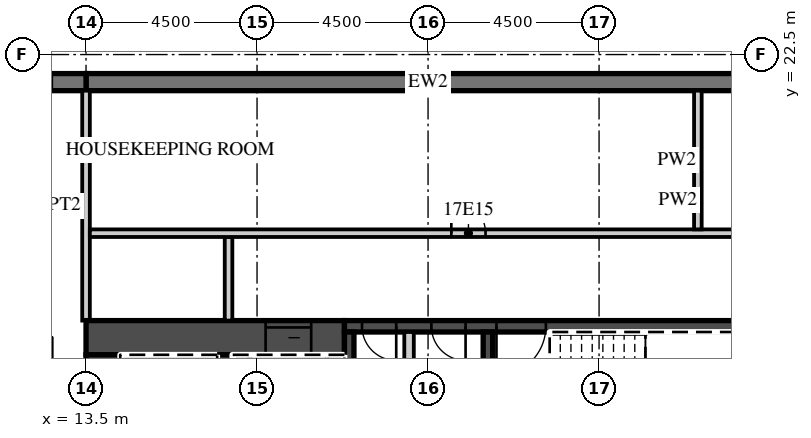
"""IFC4 building model, lengths in metres.
Left out: names, types, materials, properties, quantities, classifications, styles, units other than length and angle.
Written with IfcOpenShell. Run it as: python <this file> out.ifc"""

import sys

from ifc_helpers import new_model, si_unit, direction, frame, frame_2d, origin, place, context, subcontext, project, spatial, rectangle, extrude, element, fill, save


model = new_model("IFC4")
c1 = context("Model", 3, precision=1e-05, world=origin(), true_north=direction((0.0, 1.0)))
c2 = subcontext(c1, "Body", "Model", "MODEL_VIEW")
j1 = project(units=[si_unit("LENGTHUNIT", "METRE"), si_unit("PLANEANGLEUNIT", "RADIAN")], contexts=[c1])
p1 = place(None, origin())
s1 = spatial("IfcSite", under=j1, at=p1, CompositionType="ELEMENT")
p2 = place(p1, origin())
s2 = spatial("IfcBuilding", under=s1, at=p2, CompositionType="ELEMENT")
p3 = place(p2, frame((0.0, 0.0, 86.4)))
s3 = spatial("IfcBuildingStorey", under=s2, at=p3, CompositionType="ELEMENT", Elevation=86.4)
p4 = place(p3, frame((31.5, 21.775, 0.0), z_axis=(0.0, 0.0, 1.0), x_axis=(-1.0, 0.0, 0.0)))
e1 = element("IfcWall", 1, at=p4, inside=s3, PredefinedType="SOLIDWALL", context=c2, shape_type="SweptSolid", body=[
    extrude(rectangle(XDim=18.0, YDim=0.45, at=frame_2d((9.0, 0.0))), origin(), (0.0, 0.0, 1.0), 3.02),
])
p5 = place(p3, frame((13.5, 21.775, 0.0), z_axis=(0.0, 0.0, 1.0), x_axis=(-1.0, 0.0, 0.0)))
e2 = element("IfcWall", 2, at=p5, inside=s3, PredefinedType="SOLIDWALL", context=c2, shape_type="SweptSolid", body=[
    extrude(rectangle(XDim=54.5, YDim=0.45, at=frame_2d((27.25, 0.0))), origin(), (0.0, 0.0, 1.0), 3.02),
])
p6 = place(p5, frame((0.9, 0.0, 0.45)))
e3 = element("IfcOpeningElement", 3, at=p6, cuts=e2, PredefinedType="OPENING", context=c2, shape_type="SweptSolid", body=[
    extrude(rectangle(XDim=2.7, YDim=2.25, at=frame_2d((1.35, 1.125))), frame((0.0, 0.235, 0.0), z_axis=(0.0, -1.0, 0.0), x_axis=(1.0, 0.0, 0.0)), (0.0, 0.0, 1.0), 0.47),
])
p7 = place(p5, frame((5.4, 0.0, 0.45)))
e4 = element("IfcOpeningElement", 4, at=p7, cuts=e2, PredefinedType="OPENING", context=c2, shape_type="SweptSolid", body=[
    extrude(rectangle(XDim=2.7, YDim=2.25, at=frame_2d((1.35, 1.125))), frame((0.0, 0.235, 0.0), z_axis=(0.0, -1.0, 0.0), x_axis=(1.0, 0.0, 0.0)), (0.0, 0.0, 1.0), 0.47),
])
p8 = place(p5, frame((9.9, 0.0, 0.45)))
e5 = element("IfcOpeningElement", 5, at=p8, cuts=e2, PredefinedType="OPENING", context=c2, shape_type="SweptSolid", body=[
    extrude(rectangle(XDim=2.7, YDim=2.25, at=frame_2d((1.35, 1.125))), frame((0.0, 0.235, 0.0), z_axis=(0.0, -1.0, 0.0), x_axis=(1.0, 0.0, 0.0)), (0.0, 0.0, 1.0), 0.47),
])
p9 = place(p5, frame((14.4, 0.0, 0.45)))
e6 = element("IfcOpeningElement", 6, at=p9, cuts=e2, PredefinedType="OPENING", context=c2, shape_type="SweptSolid", body=[
    extrude(rectangle(XDim=2.7, YDim=2.25, at=frame_2d((1.35, 1.125))), frame((0.0, 0.235, 0.0), z_axis=(0.0, -1.0, 0.0), x_axis=(1.0, 0.0, 0.0)), (0.0, 0.0, 1.0), 0.47),
])
p10 = place(p5, frame((18.9, 0.0, 0.45)))
e7 = element("IfcOpeningElement", 7, at=p10, cuts=e2, PredefinedType="OPENING", context=c2, shape_type="SweptSolid", body=[
    extrude(rectangle(XDim=2.7, YDim=2.25, at=frame_2d((1.35, 1.125))), frame((0.0, 0.235, 0.0), z_axis=(0.0, -1.0, 0.0), x_axis=(1.0, 0.0, 0.0)), (0.0, 0.0, 1.0), 0.47),
])
p11 = place(p5, frame((23.4, 0.0, 0.45)))
e8 = element("IfcOpeningElement", 8, at=p11, cuts=e2, PredefinedType="OPENING", context=c2, shape_type="SweptSolid", body=[
    extrude(rectangle(XDim=2.7, YDim=2.25, at=frame_2d((1.35, 1.125))), frame((0.0, 0.235, 0.0), z_axis=(0.0, -1.0, 0.0), x_axis=(1.0, 0.0, 0.0)), (0.0, 0.0, 1.0), 0.47),
])
p12 = place(p5, frame((27.9, 0.0, 0.45)))
e9 = element("IfcOpeningElement", 9, at=p12, cuts=e2, PredefinedType="OPENING", context=c2, shape_type="SweptSolid", body=[
    extrude(rectangle(XDim=2.7, YDim=2.25, at=frame_2d((1.35, 1.125))), frame((0.0, 0.235, 0.0), z_axis=(0.0, -1.0, 0.0), x_axis=(1.0, 0.0, 0.0)), (0.0, 0.0, 1.0), 0.47),
])
p13 = place(p5, frame((32.4, 0.0, 0.45)))
e10 = element("IfcOpeningElement", 10, at=p13, cuts=e2, PredefinedType="OPENING", context=c2, shape_type="SweptSolid", body=[
    extrude(rectangle(XDim=2.7, YDim=2.25, at=frame_2d((1.35, 1.125))), frame((0.0, 0.235, 0.0), z_axis=(0.0, -1.0, 0.0), x_axis=(1.0, 0.0, 0.0)), (0.0, 0.0, 1.0), 0.47),
])
p14 = place(p5, frame((36.9, 0.0, 0.45)))
e11 = element("IfcOpeningElement", 11, at=p14, cuts=e2, PredefinedType="OPENING", context=c2, shape_type="SweptSolid", body=[
    extrude(rectangle(XDim=2.7, YDim=2.25, at=frame_2d((1.35, 1.125))), frame((0.0, 0.235, 0.0), z_axis=(0.0, -1.0, 0.0), x_axis=(1.0, 0.0, 0.0)), (0.0, 0.0, 1.0), 0.47),
])
p15 = place(p5, frame((41.4, 0.0, 0.45)))
e12 = element("IfcOpeningElement", 12, at=p15, cuts=e2, PredefinedType="OPENING", context=c2, shape_type="SweptSolid", body=[
    extrude(rectangle(XDim=2.7, YDim=2.25, at=frame_2d((1.35, 1.125))), frame((0.0, 0.235, 0.0), z_axis=(0.0, -1.0, 0.0), x_axis=(1.0, 0.0, 0.0)), (0.0, 0.0, 1.0), 0.47),
])
p16 = place(p5, frame((45.9, 0.0, 0.45)))
e13 = element("IfcOpeningElement", 13, at=p16, cuts=e2, PredefinedType="OPENING", context=c2, shape_type="SweptSolid", body=[
    extrude(rectangle(XDim=2.7, YDim=2.25, at=frame_2d((1.35, 1.125))), frame((0.0, 0.235, 0.0), z_axis=(0.0, -1.0, 0.0), x_axis=(1.0, 0.0, 0.0)), (0.0, 0.0, 1.0), 0.47),
])
p17 = place(p5, frame((50.4, 0.0, 0.45)))
e14 = element("IfcOpeningElement", 14, at=p17, cuts=e2, PredefinedType="OPENING", context=c2, shape_type="SweptSolid", body=[
    extrude(rectangle(XDim=2.7, YDim=2.25, at=frame_2d((1.35, 1.125))), frame((0.0, 0.235, 0.0), z_axis=(0.0, -1.0, 0.0), x_axis=(1.0, 0.0, 0.0)), (0.0, 0.0, 1.0), 0.47),
])
p18 = place(p3, frame((13.5, 15.5, 0.0), z_axis=(0.0, 0.0, 1.0), x_axis=(0.0, 1.0, 0.0)))
e15 = element("IfcWall", 15, at=p18, inside=s3, PredefinedType="PARTITIONING", context=c2, shape_type="SweptSolid", body=[
    extrude(rectangle(XDim=6.05, YDim=0.2, at=frame_2d((3.025, 0.0))), origin(), (0.0, 0.0, 1.0), 3.02),
])
p19 = place(p3, frame((13.5, 15.05, 0.0), z_axis=(0.0, 0.0, 1.0), x_axis=(1.0, 0.0, 0.0)))
e16 = element("IfcWall", 16, at=p19, inside=s3, PredefinedType="SHEAR", context=c2, shape_type="SweptSolid", body=[
    extrude(rectangle(XDim=6.8, YDim=0.9, at=frame_2d((3.4, 0.0))), origin(), (0.0, 0.0, 1.0), 3.02),
])
p20 = place(p19, frame((4.725, 0.0, 0.0)))
e17 = element("IfcOpeningElement", 17, at=p20, cuts=e16, PredefinedType="OPENING", context=c2, shape_type="SweptSolid", body=[
    extrude(rectangle(XDim=1.2, YDim=2.1, at=frame_2d((0.6, 1.05))), frame((0.0, 0.46, 0.0), z_axis=(0.0, -1.0, 0.0), x_axis=(1.0, 0.0, 0.0)), (0.0, 0.0, 1.0), 0.92),
])
p21 = place(p3, frame((20.3, 15.35, 0.0), z_axis=(0.0, 0.0, 1.0), x_axis=(1.0, 0.0, 0.0)))
e18 = element("IfcWall", 18, at=p21, inside=s3, PredefinedType="SHEAR", context=c2, shape_type="SweptSolid", body=[
    extrude(rectangle(XDim=10.3, YDim=0.3, at=frame_2d((5.15, 0.0))), origin(), (0.0, 0.0, 1.0), 3.02),
])
p22 = place(p21, frame((4.0, 0.0, 0.0)))
e19 = element("IfcOpeningElement", 19, at=p22, cuts=e18, PredefinedType="OPENING", context=c2, shape_type="SweptSolid", body=[
    extrude(rectangle(XDim=1.3, YDim=2.1, at=frame_2d((0.65, 1.05))), frame((0.0, 0.16, 0.0), z_axis=(0.0, -1.0, 0.0), x_axis=(1.0, 0.0, 0.0)), (0.0, 0.0, 1.0), 0.32),
])
p23 = place(p21, frame((2.288, 0.0, 0.0)))
e20 = element("IfcOpeningElement", 20, at=p23, cuts=e18, PredefinedType="OPENING", context=c2, shape_type="SweptSolid", body=[
    extrude(rectangle(XDim=0.9, YDim=2.1, at=frame_2d((0.45, 1.05))), frame((0.0, 0.16, 0.0), z_axis=(0.0, -1.0, 0.0), x_axis=(1.0, 0.0, 0.0)), (0.0, 0.0, 1.0), 0.32),
])
p24 = place(p21, frame((0.462, 0.0, 0.0)))
e21 = element("IfcOpeningElement", 21, at=p24, cuts=e18, PredefinedType="OPENING", context=c2, shape_type="SweptSolid", body=[
    extrude(rectangle(XDim=0.9, YDim=2.1, at=frame_2d((0.45, 1.05))), frame((0.0, 0.16, 0.0), z_axis=(0.0, -1.0, 0.0), x_axis=(1.0, 0.0, 0.0)), (0.0, 0.0, 1.0), 0.32),
])
p25 = place(p3, frame((13.95, 2.4, 0.0), z_axis=(0.0, 0.0, 1.0), x_axis=(0.0, 1.0, 0.0)))
e22 = element("IfcWall", 22, at=p25, inside=s3, PredefinedType="SHEAR", context=c2, shape_type="SweptSolid", body=[
    extrude(rectangle(XDim=12.2, YDim=0.9, at=frame_2d((6.1, 0.0))), origin(), (0.0, 0.0, 1.0), 3.02),
])
p26 = place(p3, frame((17.15, 8.8, 0.0), z_axis=(0.0, 0.0, 1.0), x_axis=(0.0, 1.0, 0.0)))
e23 = element("IfcWall", 23, at=p26, inside=s3, PredefinedType="SHEAR", context=c2, shape_type="SweptSolid", body=[
    extrude(rectangle(XDim=5.8, YDim=0.4, at=frame_2d((2.9, 0.0))), origin(), (0.0, 0.0, 1.0), 3.02),
])
for number, where, z_axis, x_axis in (
    (24, (20.425, 11.95, 0.0), (0.0, 0.0, 1.0), (0.0, 1.0, 0.0)),
    (25, (24.075, 11.95, 0.0), (0.0, 0.0, 1.0), (0.0, 1.0, 0.0)),
):
    element("IfcWall", number, at=place(p3, frame(where, z_axis=z_axis, x_axis=x_axis)), inside=s3, PredefinedType="SHEAR", context=c2, shape_type="SweptSolid", body=[
        extrude(rectangle(XDim=3.25, YDim=0.25, at=frame_2d((1.625, 0.0))), origin(), (0.0, 0.0, 1.0), 3.02),
    ])
p27 = place(p3, frame((22.0, 11.95, 0.0), z_axis=(0.0, 0.0, 1.0), x_axis=(0.0, 1.0, 0.0)))
e26 = element("IfcWall", 26, at=p27, inside=s3, PredefinedType="PARTITIONING", context=c2, shape_type="SweptSolid", body=[
    extrude(rectangle(XDim=3.25, YDim=0.25, at=frame_2d((1.625, 0.0))), origin(), (0.0, 0.0, 1.0), 3.02),
])
p28 = place(p3, frame((17.25, 15.5, 0.0), z_axis=(0.0, 0.0, 1.0), x_axis=(0.0, 1.0, 0.0)))
e27 = element("IfcWall", 27, at=p28, inside=s3, PredefinedType="PARTITIONING", context=c2, shape_type="SweptSolid", body=[
    extrude(rectangle(XDim=2.2, YDim=0.2, at=frame_2d((1.1, 0.0))), origin(), (0.0, 0.0, 1.0), 3.02),
])
p29 = place(p3, frame((13.6, 17.8, 0.0), z_axis=(0.0, 0.0, 1.0), x_axis=(1.0, 0.0, 0.0)))
e28 = element("IfcWall", 28, at=p29, inside=s3, PredefinedType="PARTITIONING", context=c2, shape_type="SweptSolid", body=[
    extrude(rectangle(XDim=30.95, YDim=0.2, at=frame_2d((15.475, 0.0))), origin(), (0.0, 0.0, 1.0), 3.02),
])
p30 = place(p29, frame((17.812, 0.0, 0.0)))
e29 = element("IfcOpeningElement", 29, at=p30, cuts=e28, PredefinedType="OPENING", context=c2, shape_type="SweptSolid", body=[
    extrude(rectangle(XDim=0.9, YDim=2.1, at=frame_2d((0.45, 1.05))), frame((0.0, 0.11, 0.0), z_axis=(0.0, -1.0, 0.0), x_axis=(1.0, 0.0, 0.0)), (0.0, 0.0, 1.0), 0.22),
])
p31 = place(p29, frame((9.512, 0.0, 0.0)))
e30 = element("IfcOpeningElement", 30, at=p31, cuts=e28, PredefinedType="OPENING", context=c2, shape_type="SweptSolid", body=[
    extrude(rectangle(XDim=0.9, YDim=2.1, at=frame_2d((0.45, 1.05))), frame((0.0, 0.11, 0.0), z_axis=(0.0, -1.0, 0.0), x_axis=(1.0, 0.0, 0.0)), (0.0, 0.0, 1.0), 0.22),
])
p32 = place(p3, frame((29.6, 17.9, 0.0), z_axis=(0.0, 0.0, 1.0), x_axis=(0.0, 1.0, 0.0)))
e31 = element("IfcWall", 31, at=p32, inside=s3, PredefinedType="PARTITIONING", context=c2, shape_type="SweptSolid", body=[
    extrude(rectangle(XDim=3.65, YDim=0.2, at=frame_2d((1.825, 0.0))), origin(), (0.0, 0.0, 1.0), 3.02),
])
p33 = place(p20, origin())
e32 = element("IfcDoor", 32, at=p33, inside=s3, OperationType="SLIDING_TO_LEFT", PredefinedType="DOOR", context=c2, shape_type="SweptSolid", body=[
    extrude(rectangle(XDim=1.2, YDim=2.1, at=frame_2d((0.6, 1.05))), frame((0.0, 0.025, 0.0), z_axis=(0.0, -1.0, 0.0), x_axis=(1.0, 0.0, 0.0)), (0.0, 0.0, 1.0), 0.05),
])
fill(e17, e32)
p34 = place(p22, origin())
e33 = element("IfcDoor", 33, at=p34, inside=s3, OperationType="SINGLE_SWING_LEFT", PredefinedType="DOOR", context=c2, shape_type="SweptSolid", body=[
    extrude(rectangle(XDim=1.3, YDim=2.1, at=frame_2d((0.65, 1.05))), frame((0.0, 0.025, 0.0), z_axis=(0.0, -1.0, 0.0), x_axis=(1.0, 0.0, 0.0)), (0.0, 0.0, 1.0), 0.05),
])
fill(e19, e33)
p35 = place(p23, origin())
e34 = element("IfcDoor", 34, at=p35, inside=s3, OperationType="SINGLE_SWING_RIGHT", PredefinedType="DOOR", context=c2, shape_type="SweptSolid", body=[
    extrude(rectangle(XDim=0.9, YDim=2.1, at=frame_2d((0.45, 1.05))), frame((0.0, 0.025, 0.0), z_axis=(0.0, -1.0, 0.0), x_axis=(1.0, 0.0, 0.0)), (0.0, 0.0, 1.0), 0.05),
])
fill(e20, e34)
p36 = place(p24, origin())
e35 = element("IfcDoor", 35, at=p36, inside=s3, OperationType="SINGLE_SWING_RIGHT", PredefinedType="DOOR", context=c2, shape_type="SweptSolid", body=[
    extrude(rectangle(XDim=0.9, YDim=2.1, at=frame_2d((0.45, 1.05))), frame((0.0, 0.025, 0.0), z_axis=(0.0, -1.0, 0.0), x_axis=(1.0, 0.0, 0.0)), (0.0, 0.0, 1.0), 0.05),
])
fill(e21, e35)
p37 = place(p31, origin())
e36 = element("IfcDoor", 36, at=p37, inside=s3, OperationType="SINGLE_SWING_LEFT", PredefinedType="DOOR", context=c2, shape_type="SweptSolid", body=[
    extrude(rectangle(XDim=0.9, YDim=2.1, at=frame_2d((0.45, 1.05))), frame((0.0, 0.025, 0.0), z_axis=(0.0, -1.0, 0.0), x_axis=(1.0, 0.0, 0.0)), (0.0, 0.0, 1.0), 0.05),
])
fill(e30, e36)
save(model, sys.argv[1])
